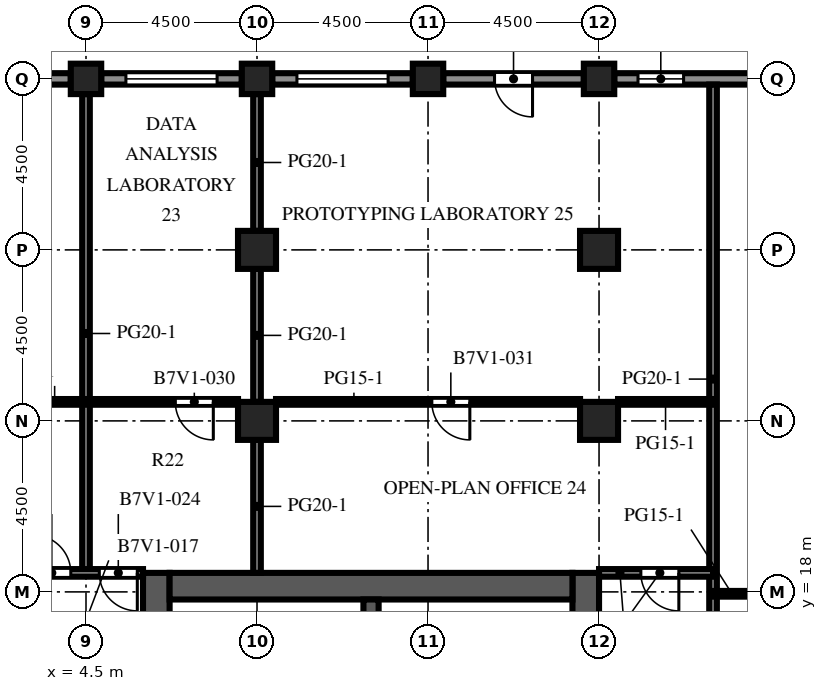
"""IFC4 building model, lengths in metres.
Left out: names, types, materials, properties, quantities, classifications, styles, units other than length and angle.
Written with IfcOpenShell. Run it as: python <this file> out.ifc"""

import sys

from ifc_helpers import new_model, si_unit, direction, frame, frame_2d, origin, origin_2d, place, context, subcontext, project, spatial, rectangle, extrude, element, fill, save


model = new_model("IFC4")
c1 = context("Model", 3, precision=1e-05, world=origin(), true_north=direction((0.0, 1.0)))
c2 = subcontext(c1, "Body", "Model", "MODEL_VIEW")
j1 = project(units=[si_unit("LENGTHUNIT", "METRE"), si_unit("PLANEANGLEUNIT", "RADIAN")], contexts=[c1])
p1 = place(None, origin())
s1 = spatial("IfcSite", under=j1, at=p1, CompositionType="ELEMENT")
p2 = place(p1, origin())
s2 = spatial("IfcBuilding", under=s1, at=p2, CompositionType="ELEMENT")
p3 = place(p2, frame((0.0, 0.0, 248.0)))
s3 = spatial("IfcBuildingStorey", under=s2, at=p3, CompositionType="ELEMENT", Elevation=248.0)
for number, where, z_axis, x_axis in (
    (1, (4.5, 31.5, 0.0), (0.0, 0.0, 1.0), (1.0, 0.0, 0.0)),
    (2, (9.0, 31.5, 0.0), (0.0, 0.0, 1.0), (1.0, 0.0, 0.0)),
    (3, (13.5, 31.5, 0.0), (0.0, 0.0, 1.0), (1.0, 0.0, 0.0)),
    (4, (18.0, 31.5, 0.0), (0.0, 0.0, 1.0), (1.0, 0.0, 0.0)),
):
    element("IfcColumn", number, at=place(p3, frame(where, z_axis=z_axis, x_axis=x_axis)), inside=s3, PredefinedType="COLUMN", context=c2, shape_type="SweptSolid", body=[
        extrude(rectangle(XDim=0.8, YDim=0.8, at=origin_2d()), origin(), (0.0, 0.0, 1.0), 4.1),
    ])
for number, where, z_axis, x_axis in (
    (5, (9.0, 22.5, 0.0), (0.0, 0.0, 1.0), (1.0, 0.0, 0.0)),
    (6, (9.0, 27.0, 0.0), (0.0, 0.0, 1.0), (1.0, 0.0, 0.0)),
    (7, (18.0, 22.5, 0.0), (0.0, 0.0, 1.0), (1.0, 0.0, 0.0)),
    (8, (18.0, 27.0, 0.0), (0.0, 0.0, 1.0), (1.0, 0.0, 0.0)),
):
    element("IfcColumn", number, at=place(p3, frame(where, z_axis=z_axis, x_axis=x_axis)), inside=s3, PredefinedType="COLUMN", context=c2, shape_type="SweptSolid", body=[
        extrude(rectangle(XDim=1.0, YDim=1.0, at=origin_2d()), origin(), (0.0, 0.0, 1.0), 4.1),
    ])
p4 = place(p3, frame((6.35, -9.0, 0.0), z_axis=(0.0, 0.0, 1.0), x_axis=(0.0, 1.0, 0.0)))
e9 = element("IfcWall", 9, at=p4, inside=s3, PredefinedType="SHEAR", context=c2, shape_type="SweptSolid", body=[
    extrude(rectangle(XDim=27.5, YDim=0.7, at=frame_2d((13.75, 0.0))), origin(), (0.0, 0.0, 1.0), 4.1),
])
p5 = place(p4, frame((12.55, 0.0, 0.0)))
e10 = element("IfcOpeningElement", 10, at=p5, cuts=e9, PredefinedType="OPENING", context=c2, shape_type="SweptSolid", body=[
    extrude(rectangle(XDim=2.4, YDim=2.4, at=frame_2d((1.2, 1.2))), frame((0.0, 0.36, 0.0), z_axis=(0.0, -1.0, 0.0), x_axis=(1.0, 0.0, 0.0)), (0.0, 0.0, 1.0), 0.72),
])
p6 = place(p4, frame((3.9, 0.0, 0.0)))
e11 = element("IfcOpeningElement", 11, at=p6, cuts=e9, PredefinedType="OPENING", context=c2, shape_type="SweptSolid", body=[
    extrude(rectangle(XDim=1.2, YDim=2.1, at=frame_2d((0.6, 1.05))), frame((0.0, 0.36, 0.0), z_axis=(0.0, -1.0, 0.0), x_axis=(1.0, 0.0, 0.0)), (0.0, 0.0, 1.0), 0.72),
])
p7 = place(p4, frame((22.4, 0.0, 0.0)))
e12 = element("IfcOpeningElement", 12, at=p7, cuts=e9, PredefinedType="OPENING", context=c2, shape_type="SweptSolid", body=[
    extrude(rectangle(XDim=1.2, YDim=2.1, at=frame_2d((0.6, 1.05))), frame((0.0, 0.36, 0.0), z_axis=(0.0, -1.0, 0.0), x_axis=(1.0, 0.0, 0.0)), (0.0, 0.0, 1.0), 0.72),
])
p8 = place(p3, frame((17.65, -9.0, 0.0), z_axis=(0.0, 0.0, 1.0), x_axis=(0.0, 1.0, 0.0)))
e13 = element("IfcWall", 13, at=p8, inside=s3, PredefinedType="SHEAR", context=c2, shape_type="SweptSolid", body=[
    extrude(rectangle(XDim=27.5, YDim=0.7, at=frame_2d((13.75, 0.0))), origin(), (0.0, 0.0, 1.0), 4.1),
])
p9 = place(p8, frame((12.55, 0.0, 0.0)))
e14 = element("IfcOpeningElement", 14, at=p9, cuts=e13, PredefinedType="OPENING", context=c2, shape_type="SweptSolid", body=[
    extrude(rectangle(XDim=2.4, YDim=2.4, at=frame_2d((1.2, 1.2))), frame((0.0, 0.36, 0.0), z_axis=(0.0, -1.0, 0.0), x_axis=(1.0, 0.0, 0.0)), (0.0, 0.0, 1.0), 0.72),
])
p10 = place(p8, frame((6.825, 0.0, 0.0)))
e15 = element("IfcOpeningElement", 15, at=p10, cuts=e13, PredefinedType="OPENING", context=c2, shape_type="SweptSolid", body=[
    extrude(rectangle(XDim=1.2, YDim=2.1, at=frame_2d((0.6, 1.05))), frame((0.0, 0.36, 0.0), z_axis=(0.0, -1.0, 0.0), x_axis=(1.0, 0.0, 0.0)), (0.0, 0.0, 1.0), 0.72),
])
p11 = place(p8, frame((19.475, 0.0, 0.0)))
e16 = element("IfcOpeningElement", 16, at=p11, cuts=e13, PredefinedType="OPENING", context=c2, shape_type="SweptSolid", body=[
    extrude(rectangle(XDim=1.2, YDim=2.1, at=frame_2d((0.6, 1.05))), frame((0.0, 0.36, 0.0), z_axis=(0.0, -1.0, 0.0), x_axis=(1.0, 0.0, 0.0)), (0.0, 0.0, 1.0), 0.72),
])
p12 = place(p3, frame((6.7, 18.15, 0.0), z_axis=(0.0, 0.0, 1.0), x_axis=(1.0, 0.0, 0.0)))
e17 = element("IfcWall", 17, at=p12, inside=s3, PredefinedType="SHEAR", context=c2, shape_type="SweptSolid", body=[
    extrude(rectangle(XDim=10.6, YDim=0.7, at=frame_2d((5.3, 0.0))), origin(), (0.0, 0.0, 1.0), 4.1),
])
p13 = place(p3, frame((12.0, 10.2, 0.0), z_axis=(0.0, 0.0, 1.0), x_axis=(0.0, 1.0, 0.0)))
e18 = element("IfcWall", 18, at=p13, inside=s3, PredefinedType="SHEAR", context=c2, shape_type="SweptSolid", body=[
    extrude(rectangle(XDim=7.6, YDim=0.4, at=frame_2d((3.8, 0.0))), origin(), (0.0, 0.0, 1.0), 4.1),
])
p14 = place(p3, frame((18.4, 31.5, 0.0), z_axis=(0.0, 0.0, 1.0), x_axis=(1.0, 0.0, 0.0)))
e19 = element("IfcWall", 19, at=p14, inside=s3, PredefinedType="SOLIDWALL", context=c2, shape_type="SweptSolid", body=[
    extrude(rectangle(XDim=3.7, YDim=0.3, at=frame_2d((1.85, 0.0))), origin(), (0.0, 0.0, 1.0), 2.85),
])
p15 = place(p14, frame((0.625, 0.0, 0.8)))
e20 = element("IfcOpeningElement", 20, at=p15, cuts=e19, PredefinedType="OPENING", context=c2, shape_type="SweptSolid", body=[
    extrude(rectangle(XDim=1.2, YDim=1.7, at=frame_2d((0.6, 0.85))), frame((0.0, 0.16, 0.0), z_axis=(0.0, -1.0, 0.0), x_axis=(1.0, 0.0, 0.0)), (0.0, 0.0, 1.0), 0.32),
])
p16 = place(p3, frame((13.9, 31.5, 0.0), z_axis=(0.0, 0.0, 1.0), x_axis=(1.0, 0.0, 0.0)))
e21 = element("IfcWall", 21, at=p16, inside=s3, PredefinedType="SOLIDWALL", context=c2, shape_type="SweptSolid", body=[
    extrude(rectangle(XDim=3.7, YDim=0.3, at=frame_2d((1.85, 0.0))), origin(), (0.0, 0.0, 1.0), 2.85),
])
p17 = place(p16, frame((1.35, 0.0, 0.0)))
e22 = element("IfcOpeningElement", 22, at=p17, cuts=e21, PredefinedType="OPENING", context=c2, shape_type="SweptSolid", body=[
    extrude(rectangle(XDim=1.0, YDim=2.2, at=frame_2d((0.5, 1.1))), frame((0.0, 0.16, 0.0), z_axis=(0.0, -1.0, 0.0), x_axis=(1.0, 0.0, 0.0)), (0.0, 0.0, 1.0), 0.32),
])
p18 = place(p3, frame((9.4, 31.5, 0.0), z_axis=(0.0, 0.0, 1.0), x_axis=(1.0, 0.0, 0.0)))
e23 = element("IfcWall", 23, at=p18, inside=s3, PredefinedType="SOLIDWALL", context=c2, shape_type="SweptSolid", body=[
    extrude(rectangle(XDim=3.7, YDim=0.3, at=frame_2d((1.85, 0.0))), origin(), (0.0, 0.0, 1.0), 2.85),
])
p19 = place(p18, frame((0.65, 0.0, 0.8)))
e24 = element("IfcOpeningElement", 24, at=p19, cuts=e23, PredefinedType="OPENING", context=c2, shape_type="SweptSolid", body=[
    extrude(rectangle(XDim=2.4, YDim=1.7, at=frame_2d((1.2, 0.85))), frame((0.0, 0.16, 0.0), z_axis=(0.0, -1.0, 0.0), x_axis=(1.0, 0.0, 0.0)), (0.0, 0.0, 1.0), 0.32),
])
p20 = place(p3, frame((4.9, 31.5, 0.0), z_axis=(0.0, 0.0, 1.0), x_axis=(1.0, 0.0, 0.0)))
e25 = element("IfcWall", 25, at=p20, inside=s3, PredefinedType="SOLIDWALL", context=c2, shape_type="SweptSolid", body=[
    extrude(rectangle(XDim=3.7, YDim=0.3, at=frame_2d((1.85, 0.0))), origin(), (0.0, 0.0, 1.0), 2.85),
])
p21 = place(p20, frame((0.65, 0.0, 0.8)))
e26 = element("IfcOpeningElement", 26, at=p21, cuts=e25, PredefinedType="OPENING", context=c2, shape_type="SweptSolid", body=[
    extrude(rectangle(XDim=2.4, YDim=1.7, at=frame_2d((1.2, 0.85))), frame((0.0, 0.16, 0.0), z_axis=(0.0, -1.0, 0.0), x_axis=(1.0, 0.0, 0.0)), (0.0, 0.0, 1.0), 0.32),
])
p22 = place(p3, frame((0.4, 31.5, 0.0), z_axis=(0.0, 0.0, 1.0), x_axis=(1.0, 0.0, 0.0)))
e27 = element("IfcWall", 27, at=p22, inside=s3, PredefinedType="SOLIDWALL", context=c2, shape_type="SweptSolid", body=[
    extrude(rectangle(XDim=3.7, YDim=0.3, at=frame_2d((1.85, 0.0))), origin(), (0.0, 0.0, 1.0), 2.85),
])
p23 = place(p22, frame((0.65, 0.0, 0.8)))
e28 = element("IfcOpeningElement", 28, at=p23, cuts=e27, PredefinedType="OPENING", context=c2, shape_type="SweptSolid", body=[
    extrude(rectangle(XDim=2.4, YDim=1.7, at=frame_2d((1.2, 0.85))), frame((0.0, 0.16, 0.0), z_axis=(0.0, -1.0, 0.0), x_axis=(1.0, 0.0, 0.0)), (0.0, 0.0, 1.0), 0.32),
])
p24 = place(p3, frame((8.1, 14.912, 0.0), z_axis=(0.0, 0.0, 1.0), x_axis=(0.0, 1.0, 0.0)))
e29 = element("IfcWall", 29, at=p24, inside=s3, PredefinedType="PARTITIONING", context=c2, shape_type="SweptSolid", body=[
    extrude(rectangle(XDim=2.888, YDim=0.1, at=frame_2d((1.444, 0.0))), origin(), (0.0, 0.0, 1.0), 3.65),
])
p25 = place(p24, frame((0.944, 0.0, 0.0)))
e30 = element("IfcOpeningElement", 30, at=p25, cuts=e29, PredefinedType="OPENING", context=c2, shape_type="SweptSolid", body=[
    extrude(rectangle(XDim=1.0, YDim=2.1, at=frame_2d((0.5, 1.05))), frame((0.0, 0.06, 0.0), z_axis=(0.0, -1.0, 0.0), x_axis=(1.0, 0.0, 0.0)), (0.0, 0.0, 1.0), 0.12),
])
p26 = place(p3, frame((4.5, 18.5, 0.0), z_axis=(0.0, 0.0, 1.0), x_axis=(0.0, 1.0, 0.0)))
e31 = element("IfcWall", 31, at=p26, inside=s3, PredefinedType="PARTITIONING", context=c2, shape_type="SweptSolid", body=[
    extrude(rectangle(XDim=12.6, YDim=0.2, at=frame_2d((6.3, 0.0))), origin(), (0.0, 0.0, 1.0), 3.65),
])
for number, where, z_axis, x_axis in (
    (32, (9.0, 18.5, 0.0), (0.0, 0.0, 1.0), (0.0, 1.0, 0.0)),
    (33, (9.0, 23.0, 0.0), (0.0, 0.0, 1.0), (0.0, 1.0, 0.0)),
):
    element("IfcWall", number, at=place(p3, frame(where, z_axis=z_axis, x_axis=x_axis)), inside=s3, PredefinedType="PARTITIONING", context=c2, shape_type="SweptSolid", body=[
        extrude(rectangle(XDim=3.5, YDim=0.2, at=frame_2d((1.75, 0.0))), origin(), (0.0, 0.0, 1.0), 3.65),
    ])
p27 = place(p3, frame((9.0, 27.5, 0.0), z_axis=(0.0, 0.0, 1.0), x_axis=(0.0, 1.0, 0.0)))
e34 = element("IfcWall", 34, at=p27, inside=s3, PredefinedType="PARTITIONING", context=c2, shape_type="SweptSolid", body=[
    extrude(rectangle(XDim=3.6, YDim=0.2, at=frame_2d((1.8, 0.0))), origin(), (0.0, 0.0, 1.0), 3.65),
])
p28 = place(p3, frame((21.0, 31.35, 0.0), z_axis=(0.0, 0.0, 1.0), x_axis=(0.0, -1.0, 0.0)))
e35 = element("IfcWall", 35, at=p28, inside=s3, PredefinedType="PARTITIONING", context=c2, shape_type="SweptSolid", body=[
    extrude(rectangle(XDim=25.1, YDim=0.2, at=frame_2d((12.55, 0.0))), origin(), (0.0, 0.0, 1.0), 3.65),
])
p29 = place(p28, frame((15.5, 0.0, 0.0)))
e36 = element("IfcOpeningElement", 36, at=p29, cuts=e35, PredefinedType="OPENING", context=c2, shape_type="SweptSolid", body=[
    extrude(rectangle(XDim=1.0, YDim=2.1, at=frame_2d((0.5, 1.05))), frame((0.0, 0.11, 0.0), z_axis=(0.0, -1.0, 0.0), x_axis=(1.0, 0.0, 0.0)), (0.0, 0.0, 1.0), 0.22),
])
p30 = place(p3, frame((21.0, 17.95, 0.0), z_axis=(0.0, 0.0, 1.0), x_axis=(1.0, 0.0, 0.0)))
e37 = element("IfcWall", 37, at=p30, inside=s3, PredefinedType="PARTITIONING", context=c2, shape_type="SweptSolid", body=[
    extrude(rectangle(XDim=1.0, YDim=0.15, at=frame_2d((0.5, 0.0))), origin(), (0.0, 0.0, 1.0), 3.65),
])
p31 = place(p3, frame((1.5, 18.5, 0.0), z_axis=(0.0, 0.0, 1.0), x_axis=(1.0, 0.0, 0.0)))
e38 = element("IfcWall", 38, at=p31, inside=s3, PredefinedType="PARTITIONING", context=c2, shape_type="SweptSolid", body=[
    extrude(rectangle(XDim=4.5, YDim=0.2, at=frame_2d((2.25, 0.0))), origin(), (0.0, 0.0, 1.0), 3.65),
])
p32 = place(p31, frame((1.6, 0.0, 0.0)))
e39 = element("IfcOpeningElement", 39, at=p32, cuts=e38, PredefinedType="OPENING", context=c2, shape_type="SweptSolid", body=[
    extrude(rectangle(XDim=1.0, YDim=2.1, at=frame_2d((0.5, 1.05))), frame((0.0, 0.11, 0.0), z_axis=(0.0, -1.0, 0.0), x_axis=(1.0, 0.0, 0.0)), (0.0, 0.0, 1.0), 0.22),
])
p33 = place(p31, frame((3.35, 0.0, 0.0)))
e40 = element("IfcOpeningElement", 40, at=p33, cuts=e38, PredefinedType="OPENING", context=c2, shape_type="SweptSolid", body=[
    extrude(rectangle(XDim=1.0, YDim=2.1, at=frame_2d((0.5, 1.05))), frame((0.0, 0.11, 0.0), z_axis=(0.0, -1.0, 0.0), x_axis=(1.0, 0.0, 0.0)), (0.0, 0.0, 1.0), 0.22),
])
p34 = place(p3, frame((18.0, 18.5, 0.0), z_axis=(0.0, 0.0, 1.0), x_axis=(1.0, 0.0, 0.0)))
e41 = element("IfcWall", 41, at=p34, inside=s3, PredefinedType="PARTITIONING", context=c2, shape_type="SweptSolid", body=[
    extrude(rectangle(XDim=3.0, YDim=0.2, at=frame_2d((1.5, 0.0))), origin(), (0.0, 0.0, 1.0), 3.65),
])
p35 = place(p34, frame((1.1, 0.0, 0.0)))
e42 = element("IfcOpeningElement", 42, at=p35, cuts=e41, PredefinedType="OPENING", context=c2, shape_type="SweptSolid", body=[
    extrude(rectangle(XDim=1.0, YDim=2.1, at=frame_2d((0.5, 1.05))), frame((0.0, 0.11, 0.0), z_axis=(0.0, -1.0, 0.0), x_axis=(1.0, 0.0, 0.0)), (0.0, 0.0, 1.0), 0.22),
])
p36 = place(p3, frame((0.5, 23.0, 0.0), z_axis=(0.0, 0.0, 1.0), x_axis=(1.0, 0.0, 0.0)))
e43 = element("IfcWall", 43, at=p36, inside=s3, PredefinedType="PARTITIONING", context=c2, shape_type="SweptSolid", body=[
    extrude(rectangle(XDim=8.0, YDim=0.15, at=frame_2d((4.0, 0.0))), origin(), (0.0, 0.0, 1.0), 3.65),
])
p37 = place(p36, frame((6.35, 0.0, 0.0)))
e44 = element("IfcOpeningElement", 44, at=p37, cuts=e43, PredefinedType="OPENING", context=c2, shape_type="SweptSolid", body=[
    extrude(rectangle(XDim=1.0, YDim=2.1, at=frame_2d((0.5, 1.05))), frame((0.0, 0.085, 0.0), z_axis=(0.0, -1.0, 0.0), x_axis=(1.0, 0.0, 0.0)), (0.0, 0.0, 1.0), 0.17),
])
p38 = place(p3, frame((9.5, 23.0, 0.0), z_axis=(0.0, 0.0, 1.0), x_axis=(1.0, 0.0, 0.0)))
e45 = element("IfcWall", 45, at=p38, inside=s3, PredefinedType="PARTITIONING", context=c2, shape_type="SweptSolid", body=[
    extrude(rectangle(XDim=8.0, YDim=0.15, at=frame_2d((4.0, 0.0))), origin(), (0.0, 0.0, 1.0), 3.65),
])
p39 = place(p38, frame((4.1, 0.0, 0.0)))
e46 = element("IfcOpeningElement", 46, at=p39, cuts=e45, PredefinedType="OPENING", context=c2, shape_type="SweptSolid", body=[
    extrude(rectangle(XDim=1.0, YDim=2.1, at=frame_2d((0.5, 1.05))), frame((0.0, 0.085, 0.0), z_axis=(0.0, -1.0, 0.0), x_axis=(1.0, 0.0, 0.0)), (0.0, 0.0, 1.0), 0.17),
])
p40 = place(p3, frame((18.5, 23.0, 0.0), z_axis=(0.0, 0.0, 1.0), x_axis=(1.0, 0.0, 0.0)))
e47 = element("IfcWall", 47, at=p40, inside=s3, PredefinedType="PARTITIONING", context=c2, shape_type="SweptSolid", body=[
    extrude(rectangle(XDim=2.5, YDim=0.15, at=frame_2d((1.25, 0.0))), origin(), (0.0, 0.0, 1.0), 3.65),
])
p41 = place(p15, origin())
e48 = element("IfcWindow", 48, at=p41, inside=s3, PartitioningType="SINGLE_PANEL", PredefinedType="WINDOW", context=c2, shape_type="SweptSolid", body=[
    extrude(rectangle(XDim=1.2, YDim=1.7, at=frame_2d((0.6, 0.85))), frame((0.0, 0.03, 0.0), z_axis=(0.0, -1.0, 0.0), x_axis=(1.0, 0.0, 0.0)), (0.0, 0.0, 1.0), 0.06),
])
fill(e20, e48)
p42 = place(p17, origin())
e49 = element("IfcDoor", 49, at=p42, inside=s3, OperationType="SINGLE_SWING_RIGHT", PredefinedType="DOOR", context=c2, shape_type="SweptSolid", body=[
    extrude(rectangle(XDim=1.0, YDim=2.2, at=frame_2d((0.5, 1.1))), frame((0.0, 0.025, 0.0), z_axis=(0.0, -1.0, 0.0), x_axis=(1.0, 0.0, 0.0)), (0.0, 0.0, 1.0), 0.05),
])
fill(e22, e49)
p43 = place(p19, origin())
e50 = element("IfcWindow", 50, at=p43, inside=s3, PartitioningType="SINGLE_PANEL", PredefinedType="WINDOW", context=c2, shape_type="SweptSolid", body=[
    extrude(rectangle(XDim=2.4, YDim=1.7, at=frame_2d((1.2, 0.85))), frame((0.0, 0.03, 0.0), z_axis=(0.0, -1.0, 0.0), x_axis=(1.0, 0.0, 0.0)), (0.0, 0.0, 1.0), 0.06),
])
fill(e24, e50)
p44 = place(p21, origin())
e51 = element("IfcWindow", 51, at=p44, inside=s3, PartitioningType="SINGLE_PANEL", PredefinedType="WINDOW", context=c2, shape_type="SweptSolid", body=[
    extrude(rectangle(XDim=2.4, YDim=1.7, at=frame_2d((1.2, 0.85))), frame((0.0, 0.03, 0.0), z_axis=(0.0, -1.0, 0.0), x_axis=(1.0, 0.0, 0.0)), (0.0, 0.0, 1.0), 0.06),
])
fill(e26, e51)
p45 = place(p32, origin())
e52 = element("IfcDoor", 52, at=p45, inside=s3, OperationType="SINGLE_SWING_LEFT", PredefinedType="DOOR", context=c2, shape_type="SweptSolid", body=[
    extrude(rectangle(XDim=1.0, YDim=2.1, at=frame_2d((0.5, 1.05))), frame((0.0, 0.025, 0.0), z_axis=(0.0, -1.0, 0.0), x_axis=(1.0, 0.0, 0.0)), (0.0, 0.0, 1.0), 0.05),
])
fill(e39, e52)
p46 = place(p33, origin())
e53 = element("IfcDoor", 53, at=p46, inside=s3, OperationType="SINGLE_SWING_RIGHT", PredefinedType="DOOR", context=c2, shape_type="SweptSolid", body=[
    extrude(rectangle(XDim=1.0, YDim=2.1, at=frame_2d((0.5, 1.05))), frame((0.0, 0.025, 0.0), z_axis=(0.0, -1.0, 0.0), x_axis=(1.0, 0.0, 0.0)), (0.0, 0.0, 1.0), 0.05),
])
fill(e40, e53)
p47 = place(p35, origin())
e54 = element("IfcDoor", 54, at=p47, inside=s3, OperationType="SINGLE_SWING_RIGHT", PredefinedType="DOOR", context=c2, shape_type="SweptSolid", body=[
    extrude(rectangle(XDim=1.0, YDim=2.1, at=frame_2d((0.5, 1.05))), frame((0.0, 0.025, 0.0), z_axis=(0.0, -1.0, 0.0), x_axis=(1.0, 0.0, 0.0)), (0.0, 0.0, 1.0), 0.05),
])
fill(e42, e54)
p48 = place(p37, origin())
e55 = element("IfcDoor", 55, at=p48, inside=s3, OperationType="SINGLE_SWING_RIGHT", PredefinedType="DOOR", context=c2, shape_type="SweptSolid", body=[
    extrude(rectangle(XDim=1.0, YDim=2.1, at=frame_2d((0.5, 1.05))), frame((0.0, 0.025, 0.0), z_axis=(0.0, -1.0, 0.0), x_axis=(1.0, 0.0, 0.0)), (0.0, 0.0, 1.0), 0.05),
])
fill(e44, e55)
p49 = place(p39, origin())
e56 = element("IfcDoor", 56, at=p49, inside=s3, OperationType="SINGLE_SWING_RIGHT", PredefinedType="DOOR", context=c2, shape_type="SweptSolid", body=[
    extrude(rectangle(XDim=1.0, YDim=2.1, at=frame_2d((0.5, 1.05))), frame((0.0, 0.025, 0.0), z_axis=(0.0, -1.0, 0.0), x_axis=(1.0, 0.0, 0.0)), (0.0, 0.0, 1.0), 0.05),
])
fill(e46, e56)
save(model, sys.argv[1])
